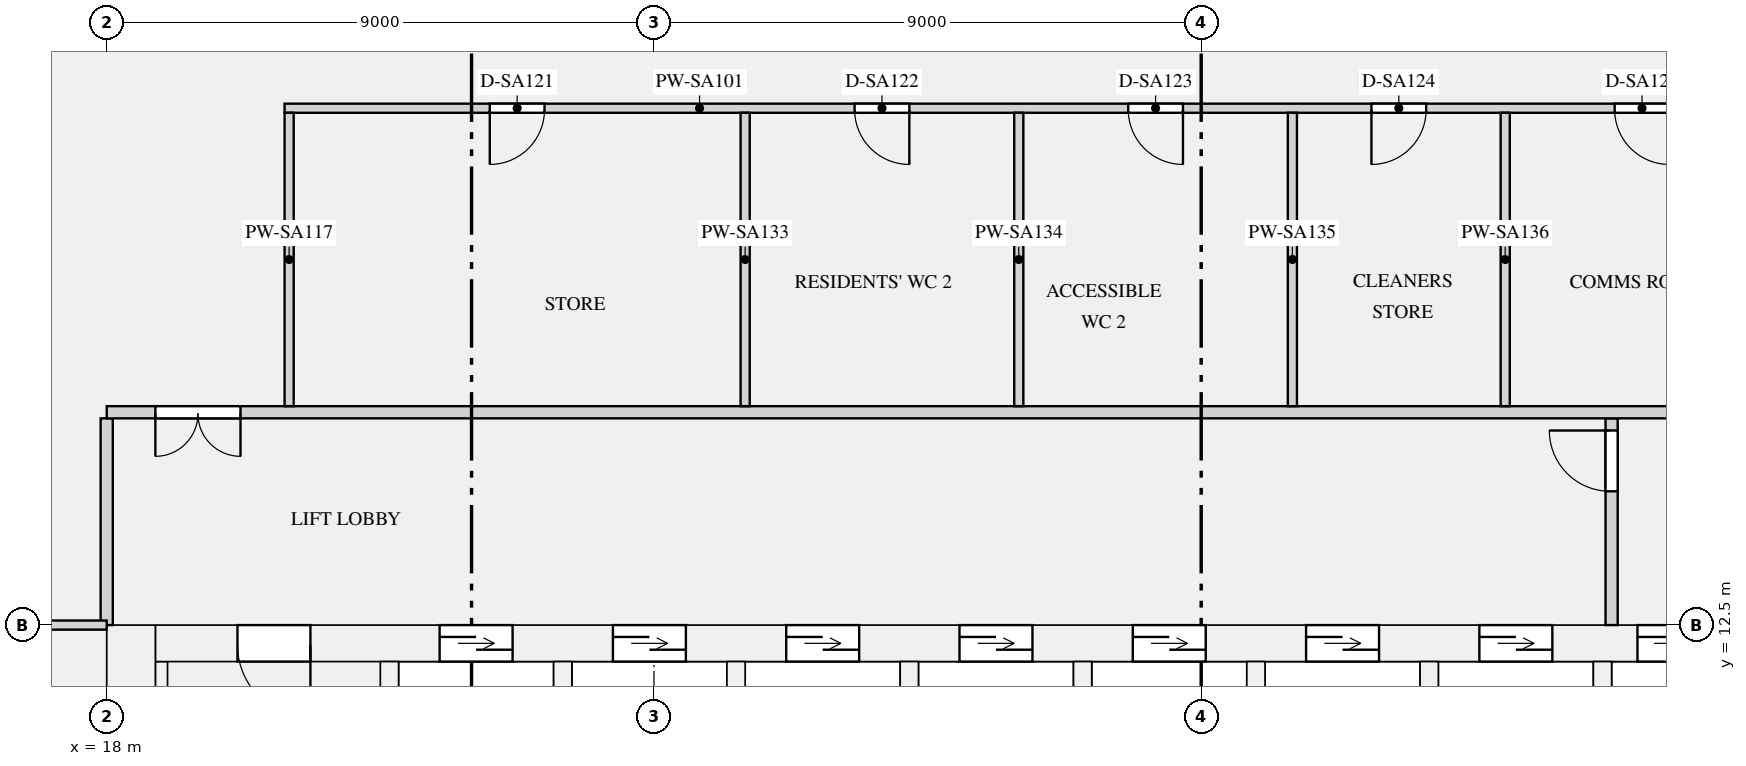
"""IFC4 building model, lengths in metres.
Left out: names, types, materials, properties, quantities, classifications, styles, units other than length and angle.
Written with IfcOpenShell. Run it as: python <this file> out.ifc"""

import sys

from ifc_helpers import new_model, si_unit, direction, frame, frame_2d, origin, place, context, subcontext, project, spatial, rectangle, extrude, element, fill, save


model = new_model("IFC4")
c1 = context("Model", 3, precision=1e-05, world=origin(), true_north=direction((0.0, 1.0)))
c2 = subcontext(c1, "Body", "Model", "MODEL_VIEW")
j1 = project(units=[si_unit("LENGTHUNIT", "METRE"), si_unit("PLANEANGLEUNIT", "RADIAN")], contexts=[c1])
p1 = place(None, origin())
s1 = spatial("IfcSite", under=j1, at=p1, CompositionType="ELEMENT")
p2 = place(p1, origin())
s2 = spatial("IfcBuilding", under=s1, at=p2, CompositionType="ELEMENT")
p3 = place(p2, frame((0.0, 0.0, 77.25)))
s3 = spatial("IfcBuildingStorey", under=s2, at=p3, CompositionType="ELEMENT", Elevation=77.25)
p4 = place(p3, frame((18.4, 0.0, 0.0), z_axis=(0.0, 0.0, 1.0), x_axis=(0.0, 1.0, 0.0)))
e1 = element("IfcWall", 1, at=p4, inside=s3, PredefinedType="SHEAR", context=c2, shape_type="SweptSolid", body=[
    extrude(rectangle(XDim=12.5, YDim=0.8, at=frame_2d((6.25, 0.0))), origin(), (0.0, 0.0, 1.0), 6.3),
])
p5 = place(p3, frame((18.8, 12.2, 0.0), z_axis=(0.0, 0.0, 1.0), x_axis=(1.0, 0.0, 0.0)))
e2 = element("IfcWall", 2, at=p5, inside=s3, PredefinedType="SHEAR", context=c2, shape_type="SweptSolid", body=[
    extrude(rectangle(XDim=34.4, YDim=0.6, at=frame_2d((17.2, 0.0))), origin(), (0.0, 0.0, 1.0), 6.3),
])
p6 = place(p5, frame((4.675, 0.0, 0.0)))
e3 = element("IfcOpeningElement", 3, at=p6, cuts=e2, PredefinedType="OPENING", context=c2, shape_type="SweptSolid", body=[
    extrude(rectangle(XDim=1.2, YDim=2.1, at=frame_2d((0.6, 1.05))), frame((0.0, 0.31, 0.0), z_axis=(0.0, -1.0, 0.0), x_axis=(1.0, 0.0, 0.0)), (0.0, 0.0, 1.0), 0.62),
])
p7 = place(p5, frame((7.525, 0.0, 0.0)))
e4 = element("IfcOpeningElement", 4, at=p7, cuts=e2, PredefinedType="OPENING", context=c2, shape_type="SweptSolid", body=[
    extrude(rectangle(XDim=1.2, YDim=2.1, at=frame_2d((0.6, 1.05))), frame((0.0, 0.31, 0.0), z_axis=(0.0, -1.0, 0.0), x_axis=(1.0, 0.0, 0.0)), (0.0, 0.0, 1.0), 0.62),
])
p8 = place(p5, frame((10.375, 0.0, 0.0)))
e5 = element("IfcOpeningElement", 5, at=p8, cuts=e2, PredefinedType="OPENING", context=c2, shape_type="SweptSolid", body=[
    extrude(rectangle(XDim=1.2, YDim=2.1, at=frame_2d((0.6, 1.05))), frame((0.0, 0.31, 0.0), z_axis=(0.0, -1.0, 0.0), x_axis=(1.0, 0.0, 0.0)), (0.0, 0.0, 1.0), 0.62),
])
p9 = place(p5, frame((13.225, 0.0, 0.0)))
e6 = element("IfcOpeningElement", 6, at=p9, cuts=e2, PredefinedType="OPENING", context=c2, shape_type="SweptSolid", body=[
    extrude(rectangle(XDim=1.2, YDim=2.1, at=frame_2d((0.6, 1.05))), frame((0.0, 0.31, 0.0), z_axis=(0.0, -1.0, 0.0), x_axis=(1.0, 0.0, 0.0)), (0.0, 0.0, 1.0), 0.62),
])
p10 = place(p5, frame((16.075, 0.0, 0.0)))
e7 = element("IfcOpeningElement", 7, at=p10, cuts=e2, PredefinedType="OPENING", context=c2, shape_type="SweptSolid", body=[
    extrude(rectangle(XDim=1.2, YDim=2.1, at=frame_2d((0.6, 1.05))), frame((0.0, 0.31, 0.0), z_axis=(0.0, -1.0, 0.0), x_axis=(1.0, 0.0, 0.0)), (0.0, 0.0, 1.0), 0.62),
])
p11 = place(p5, frame((18.925, 0.0, 0.0)))
e8 = element("IfcOpeningElement", 8, at=p11, cuts=e2, PredefinedType="OPENING", context=c2, shape_type="SweptSolid", body=[
    extrude(rectangle(XDim=1.2, YDim=2.1, at=frame_2d((0.6, 1.05))), frame((0.0, 0.31, 0.0), z_axis=(0.0, -1.0, 0.0), x_axis=(1.0, 0.0, 0.0)), (0.0, 0.0, 1.0), 0.62),
])
p12 = place(p5, frame((21.775, 0.0, 0.0)))
e9 = element("IfcOpeningElement", 9, at=p12, cuts=e2, PredefinedType="OPENING", context=c2, shape_type="SweptSolid", body=[
    extrude(rectangle(XDim=1.2, YDim=2.1, at=frame_2d((0.6, 1.05))), frame((0.0, 0.31, 0.0), z_axis=(0.0, -1.0, 0.0), x_axis=(1.0, 0.0, 0.0)), (0.0, 0.0, 1.0), 0.62),
])
p13 = place(p5, frame((24.375, 0.0, 0.0)))
e10 = element("IfcOpeningElement", 10, at=p13, cuts=e2, PredefinedType="OPENING", context=c2, shape_type="SweptSolid", body=[
    extrude(rectangle(XDim=1.1, YDim=2.1, at=frame_2d((0.55, 1.05))), frame((0.0, 0.31, 0.0), z_axis=(0.0, -1.0, 0.0), x_axis=(1.0, 0.0, 0.0)), (0.0, 0.0, 1.0), 0.62),
])
p14 = place(p5, frame((26.625, 0.0, 0.0)))
e11 = element("IfcOpeningElement", 11, at=p14, cuts=e2, PredefinedType="OPENING", context=c2, shape_type="SweptSolid", body=[
    extrude(rectangle(XDim=1.1, YDim=2.1, at=frame_2d((0.55, 1.05))), frame((0.0, 0.31, 0.0), z_axis=(0.0, -1.0, 0.0), x_axis=(1.0, 0.0, 0.0)), (0.0, 0.0, 1.0), 0.62),
])
p15 = place(p5, frame((28.875, 0.0, 0.0)))
e12 = element("IfcOpeningElement", 12, at=p15, cuts=e2, PredefinedType="OPENING", context=c2, shape_type="SweptSolid", body=[
    extrude(rectangle(XDim=1.1, YDim=2.1, at=frame_2d((0.55, 1.05))), frame((0.0, 0.31, 0.0), z_axis=(0.0, -1.0, 0.0), x_axis=(1.0, 0.0, 0.0)), (0.0, 0.0, 1.0), 0.62),
])
p16 = place(p5, frame((1.35, 0.0, 0.0)))
e13 = element("IfcOpeningElement", 13, at=p16, cuts=e2, PredefinedType="OPENING", context=c2, shape_type="SweptSolid", body=[
    extrude(rectangle(XDim=1.2, YDim=2.1, at=frame_2d((0.6, 1.05))), frame((0.0, 0.31, 0.0), z_axis=(0.0, -1.0, 0.0), x_axis=(1.0, 0.0, 0.0)), (0.0, 0.0, 1.0), 0.62),
])
p17 = place(p5, frame((31.85, 0.0, 0.0)))
e14 = element("IfcOpeningElement", 14, at=p17, cuts=e2, PredefinedType="OPENING", context=c2, shape_type="SweptSolid", body=[
    extrude(rectangle(XDim=1.2, YDim=2.1, at=frame_2d((0.6, 1.05))), frame((0.0, 0.31, 0.0), z_axis=(0.0, -1.0, 0.0), x_axis=(1.0, 0.0, 0.0)), (0.0, 0.0, 1.0), 0.62),
])
p18 = place(p3, frame((18.9, 1.0, 0.0), z_axis=(0.0, 0.0, 1.0), x_axis=(0.0, 1.0, 0.0)))
e15 = element("IfcWall", 15, at=p18, inside=s3, PredefinedType="SHEAR", context=c2, shape_type="SweptSolid", body=[
    extrude(rectangle(XDim=10.9, YDim=0.2, at=frame_2d((5.45, 0.0))), origin(), (0.0, 0.0, 1.0), 6.3),
])
for number, where, z_axis, x_axis in (
    (16, (22.65, 9.35, 0.0), (0.0, 0.0, 1.0), (0.0, 1.0, 0.0)),
    (17, (25.5, 9.35, 0.0), (0.0, 0.0, 1.0), (0.0, 1.0, 0.0)),
    (18, (28.35, 9.35, 0.0), (0.0, 0.0, 1.0), (0.0, 1.0, 0.0)),
    (19, (31.2, 9.35, 0.0), (0.0, 0.0, 1.0), (0.0, 1.0, 0.0)),
    (20, (34.05, 9.35, 0.0), (0.0, 0.0, 1.0), (0.0, 1.0, 0.0)),
    (21, (36.9, 9.35, 0.0), (0.0, 0.0, 1.0), (0.0, 1.0, 0.0)),
    (22, (39.75, 9.35, 0.0), (0.0, 0.0, 1.0), (0.0, 1.0, 0.0)),
):
    element("IfcWall", number, at=place(p3, frame(where, z_axis=z_axis, x_axis=x_axis)), inside=s3, PredefinedType="SHEAR", context=c2, shape_type="SweptSolid", body=[
        extrude(rectangle(XDim=2.55, YDim=0.3, at=frame_2d((1.275, 0.0))), origin(), (0.0, 0.0, 1.0), 6.3),
    ])
p19 = place(p3, frame((42.6, 8.25, 0.0), z_axis=(0.0, 0.0, 1.0), x_axis=(0.0, 1.0, 0.0)))
e23 = element("IfcWall", 23, at=p19, inside=s3, PredefinedType="SHEAR", context=c2, shape_type="SweptSolid", body=[
    extrude(rectangle(XDim=3.65, YDim=0.3, at=frame_2d((1.825, 0.0))), origin(), (0.0, 0.0, 1.0), 6.3),
])
p20 = place(p3, frame((18.0, 12.5, 0.0), z_axis=(0.0, 0.0, 1.0), x_axis=(0.0, 1.0, 0.0)))
e24 = element("IfcWall", 24, at=p20, inside=s3, PredefinedType="PARTITIONING", context=c2, shape_type="SweptSolid", body=[
    extrude(rectangle(XDim=3.4, YDim=0.2, at=frame_2d((1.7, 0.0))), origin(), (0.0, 0.0, 1.0), 5.98),
])
p21 = place(p3, frame((42.75, 12.5, 0.0), z_axis=(0.0, 0.0, 1.0), x_axis=(0.0, 1.0, 0.0)))
e25 = element("IfcWall", 25, at=p21, inside=s3, PredefinedType="PARTITIONING", context=c2, shape_type="SweptSolid", body=[
    extrude(rectangle(XDim=3.4, YDim=0.2, at=frame_2d((1.7, 0.0))), origin(), (0.0, 0.0, 1.0), 5.98),
])
p22 = place(p21, frame((2.2, 0.0, 0.0)))
e26 = element("IfcOpeningElement", 26, at=p22, cuts=e25, PredefinedType="OPENING", context=c2, shape_type="SweptSolid", body=[
    extrude(rectangle(XDim=1.0, YDim=2.1, at=frame_2d((0.5, 1.05))), frame((0.0, 0.11, 0.0), z_axis=(0.0, -1.0, 0.0), x_axis=(1.0, 0.0, 0.0)), (0.0, 0.0, 1.0), 0.22),
])
p23 = place(p3, frame((20.925, 21.0, 0.0), z_axis=(0.0, 0.0, 1.0), x_axis=(1.0, 0.0, 0.0)))
e27 = element("IfcWall", 27, at=p23, inside=s3, PredefinedType="PARTITIONING", context=c2, shape_type="SweptSolid", body=[
    extrude(rectangle(XDim=30.15, YDim=0.15, at=frame_2d((15.075, 0.0))), origin(), (0.0, 0.0, 1.0), 5.98),
])
p24 = place(p23, frame((3.375, 0.0, 0.0)))
e28 = element("IfcOpeningElement", 28, at=p24, cuts=e27, PredefinedType="OPENING", context=c2, shape_type="SweptSolid", body=[
    extrude(rectangle(XDim=0.9, YDim=2.1, at=frame_2d((0.45, 1.05))), frame((0.0, 0.085, 0.0), z_axis=(0.0, -1.0, 0.0), x_axis=(1.0, 0.0, 0.0)), (0.0, 0.0, 1.0), 0.17),
])
p25 = place(p23, frame((9.375, 0.0, 0.0)))
e29 = element("IfcOpeningElement", 29, at=p25, cuts=e27, PredefinedType="OPENING", context=c2, shape_type="SweptSolid", body=[
    extrude(rectangle(XDim=0.9, YDim=2.1, at=frame_2d((0.45, 1.05))), frame((0.0, 0.085, 0.0), z_axis=(0.0, -1.0, 0.0), x_axis=(1.0, 0.0, 0.0)), (0.0, 0.0, 1.0), 0.17),
])
p26 = place(p23, frame((13.875, 0.0, 0.0)))
e30 = element("IfcOpeningElement", 30, at=p26, cuts=e27, PredefinedType="OPENING", context=c2, shape_type="SweptSolid", body=[
    extrude(rectangle(XDim=0.9, YDim=2.1, at=frame_2d((0.45, 1.05))), frame((0.0, 0.085, 0.0), z_axis=(0.0, -1.0, 0.0), x_axis=(1.0, 0.0, 0.0)), (0.0, 0.0, 1.0), 0.17),
])
p27 = place(p23, frame((17.875, 0.0, 0.0)))
e31 = element("IfcOpeningElement", 31, at=p27, cuts=e27, PredefinedType="OPENING", context=c2, shape_type="SweptSolid", body=[
    extrude(rectangle(XDim=0.9, YDim=2.1, at=frame_2d((0.45, 1.05))), frame((0.0, 0.085, 0.0), z_axis=(0.0, -1.0, 0.0), x_axis=(1.0, 0.0, 0.0)), (0.0, 0.0, 1.0), 0.17),
])
p28 = place(p23, frame((21.875, 0.0, 0.0)))
e32 = element("IfcOpeningElement", 32, at=p28, cuts=e27, PredefinedType="OPENING", context=c2, shape_type="SweptSolid", body=[
    extrude(rectangle(XDim=0.9, YDim=2.1, at=frame_2d((0.45, 1.05))), frame((0.0, 0.085, 0.0), z_axis=(0.0, -1.0, 0.0), x_axis=(1.0, 0.0, 0.0)), (0.0, 0.0, 1.0), 0.17),
])
p29 = place(p23, frame((26.875, 0.0, 0.0)))
e33 = element("IfcOpeningElement", 33, at=p29, cuts=e27, PredefinedType="OPENING", context=c2, shape_type="SweptSolid", body=[
    extrude(rectangle(XDim=0.9, YDim=2.1, at=frame_2d((0.45, 1.05))), frame((0.0, 0.085, 0.0), z_axis=(0.0, -1.0, 0.0), x_axis=(1.0, 0.0, 0.0)), (0.0, 0.0, 1.0), 0.17),
])
p30 = place(p3, frame((5.25, 12.5, 0.0), z_axis=(0.0, 0.0, 1.0), x_axis=(1.0, 0.0, 0.0)))
e34 = element("IfcWall", 34, at=p30, inside=s3, PredefinedType="PARTITIONING", context=c2, shape_type="SweptSolid", body=[
    extrude(rectangle(XDim=12.75, YDim=0.15, at=frame_2d((6.375, 0.0))), origin(), (0.0, 0.0, 1.0), 5.98),
])
p31 = place(p30, frame((5.875, 0.0, 0.0)))
e35 = element("IfcOpeningElement", 35, at=p31, cuts=e34, PredefinedType="OPENING", context=c2, shape_type="SweptSolid", body=[
    extrude(rectangle(XDim=0.9, YDim=2.1, at=frame_2d((0.45, 1.05))), frame((0.0, 0.085, 0.0), z_axis=(0.0, -1.0, 0.0), x_axis=(1.0, 0.0, 0.0)), (0.0, 0.0, 1.0), 0.17),
])
p32 = place(p3, frame((18.0, 16.0, 0.0), z_axis=(0.0, 0.0, 1.0), x_axis=(1.0, 0.0, 0.0)))
e36 = element("IfcWall", 36, at=p32, inside=s3, PredefinedType="PARTITIONING", context=c2, shape_type="SweptSolid", body=[
    extrude(rectangle(XDim=36.0, YDim=0.2, at=frame_2d((18.0, 0.0))), origin(), (0.0, 0.0, 1.0), 5.98),
])
p33 = place(p32, frame((0.8, 0.0, 0.0)))
e37 = element("IfcOpeningElement", 37, at=p33, cuts=e36, PredefinedType="OPENING", context=c2, shape_type="SweptSolid", body=[
    extrude(rectangle(XDim=1.4, YDim=2.1, at=frame_2d((0.7, 1.05))), frame((0.0, 0.11, 0.0), z_axis=(0.0, -1.0, 0.0), x_axis=(1.0, 0.0, 0.0)), (0.0, 0.0, 1.0), 0.22),
])
p34 = place(p32, frame((33.8, 0.0, 0.0)))
e38 = element("IfcOpeningElement", 38, at=p34, cuts=e36, PredefinedType="OPENING", context=c2, shape_type="SweptSolid", body=[
    extrude(rectangle(XDim=1.4, YDim=2.1, at=frame_2d((0.7, 1.05))), frame((0.0, 0.11, 0.0), z_axis=(0.0, -1.0, 0.0), x_axis=(1.0, 0.0, 0.0)), (0.0, 0.0, 1.0), 0.22),
])
for number, where, z_axis, x_axis in (
    (39, (21.0, 16.1, 0.0), (0.0, 0.0, 1.0), (0.0, 1.0, 0.0)),
    (40, (28.5, 16.1, 0.0), (0.0, 0.0, 1.0), (0.0, 1.0, 0.0)),
    (41, (33.0, 16.1, 0.0), (0.0, 0.0, 1.0), (0.0, 1.0, 0.0)),
    (42, (37.5, 16.1, 0.0), (0.0, 0.0, 1.0), (0.0, 1.0, 0.0)),
    (43, (41.0, 16.1, 0.0), (0.0, 0.0, 1.0), (0.0, 1.0, 0.0)),
):
    element("IfcWall", number, at=place(p3, frame(where, z_axis=z_axis, x_axis=x_axis)), inside=s3, PredefinedType="PARTITIONING", context=c2, shape_type="SweptSolid", body=[
        extrude(rectangle(XDim=4.825, YDim=0.15, at=frame_2d((2.413, 0.0))), origin(), (0.0, 0.0, 1.0), 5.98),
    ])
p35 = place(p6, origin())
e44 = element("IfcDoor", 44, at=p35, inside=s3, OperationType="DOUBLE_DOOR_SLIDING", PredefinedType="DOOR", context=c2, shape_type="SweptSolid", body=[
    extrude(rectangle(XDim=1.2, YDim=2.1, at=frame_2d((0.6, 1.05))), frame((0.0, 0.025, 0.0), z_axis=(0.0, -1.0, 0.0), x_axis=(1.0, 0.0, 0.0)), (0.0, 0.0, 1.0), 0.05),
])
fill(e3, e44)
p36 = place(p7, origin())
e45 = element("IfcDoor", 45, at=p36, inside=s3, OperationType="DOUBLE_DOOR_SLIDING", PredefinedType="DOOR", context=c2, shape_type="SweptSolid", body=[
    extrude(rectangle(XDim=1.2, YDim=2.1, at=frame_2d((0.6, 1.05))), frame((0.0, 0.025, 0.0), z_axis=(0.0, -1.0, 0.0), x_axis=(1.0, 0.0, 0.0)), (0.0, 0.0, 1.0), 0.05),
])
fill(e4, e45)
p37 = place(p8, origin())
e46 = element("IfcDoor", 46, at=p37, inside=s3, OperationType="DOUBLE_DOOR_SLIDING", PredefinedType="DOOR", context=c2, shape_type="SweptSolid", body=[
    extrude(rectangle(XDim=1.2, YDim=2.1, at=frame_2d((0.6, 1.05))), frame((0.0, 0.025, 0.0), z_axis=(0.0, -1.0, 0.0), x_axis=(1.0, 0.0, 0.0)), (0.0, 0.0, 1.0), 0.05),
])
fill(e5, e46)
p38 = place(p9, origin())
e47 = element("IfcDoor", 47, at=p38, inside=s3, OperationType="DOUBLE_DOOR_SLIDING", PredefinedType="DOOR", context=c2, shape_type="SweptSolid", body=[
    extrude(rectangle(XDim=1.2, YDim=2.1, at=frame_2d((0.6, 1.05))), frame((0.0, 0.025, 0.0), z_axis=(0.0, -1.0, 0.0), x_axis=(1.0, 0.0, 0.0)), (0.0, 0.0, 1.0), 0.05),
])
fill(e6, e47)
p39 = place(p10, origin())
e48 = element("IfcDoor", 48, at=p39, inside=s3, OperationType="DOUBLE_DOOR_SLIDING", PredefinedType="DOOR", context=c2, shape_type="SweptSolid", body=[
    extrude(rectangle(XDim=1.2, YDim=2.1, at=frame_2d((0.6, 1.05))), frame((0.0, 0.025, 0.0), z_axis=(0.0, -1.0, 0.0), x_axis=(1.0, 0.0, 0.0)), (0.0, 0.0, 1.0), 0.05),
])
fill(e7, e48)
p40 = place(p11, origin())
e49 = element("IfcDoor", 49, at=p40, inside=s3, OperationType="DOUBLE_DOOR_SLIDING", PredefinedType="DOOR", context=c2, shape_type="SweptSolid", body=[
    extrude(rectangle(XDim=1.2, YDim=2.1, at=frame_2d((0.6, 1.05))), frame((0.0, 0.025, 0.0), z_axis=(0.0, -1.0, 0.0), x_axis=(1.0, 0.0, 0.0)), (0.0, 0.0, 1.0), 0.05),
])
fill(e8, e49)
p41 = place(p12, origin())
e50 = element("IfcDoor", 50, at=p41, inside=s3, OperationType="DOUBLE_DOOR_SLIDING", PredefinedType="DOOR", context=c2, shape_type="SweptSolid", body=[
    extrude(rectangle(XDim=1.2, YDim=2.1, at=frame_2d((0.6, 1.05))), frame((0.0, 0.025, 0.0), z_axis=(0.0, -1.0, 0.0), x_axis=(1.0, 0.0, 0.0)), (0.0, 0.0, 1.0), 0.05),
])
fill(e9, e50)
p42 = place(p13, origin())
e51 = element("IfcDoor", 51, at=p42, inside=s3, OperationType="DOUBLE_DOOR_SLIDING", PredefinedType="DOOR", context=c2, shape_type="SweptSolid", body=[
    extrude(rectangle(XDim=1.1, YDim=2.1, at=frame_2d((0.55, 1.05))), frame((0.0, 0.025, 0.0), z_axis=(0.0, -1.0, 0.0), x_axis=(1.0, 0.0, 0.0)), (0.0, 0.0, 1.0), 0.05),
])
fill(e10, e51)
p43 = place(p16, frame((1.2, 0.0, 0.0), z_axis=(0.0, 0.0, 1.0), x_axis=(-1.0, 0.0, 0.0)))
e52 = element("IfcDoor", 52, at=p43, inside=s3, OperationType="SINGLE_SWING_LEFT", PredefinedType="DOOR", context=c2, shape_type="SweptSolid", body=[
    extrude(rectangle(XDim=1.2, YDim=2.1, at=frame_2d((0.6, 1.05))), frame((0.0, 0.025, 0.0), z_axis=(0.0, -1.0, 0.0), x_axis=(1.0, 0.0, 0.0)), (0.0, 0.0, 1.0), 0.05),
])
fill(e13, e52)
p44 = place(p22, origin())
e53 = element("IfcDoor", 53, at=p44, inside=s3, OperationType="SINGLE_SWING_RIGHT", PredefinedType="DOOR", context=c2, shape_type="SweptSolid", body=[
    extrude(rectangle(XDim=1.0, YDim=2.1, at=frame_2d((0.5, 1.05))), frame((0.0, 0.025, 0.0), z_axis=(0.0, -1.0, 0.0), x_axis=(1.0, 0.0, 0.0)), (0.0, 0.0, 1.0), 0.05),
])
fill(e26, e53)
p45 = place(p33, frame((1.4, 0.0, 0.0), z_axis=(0.0, 0.0, 1.0), x_axis=(-1.0, 0.0, 0.0)))
e54 = element("IfcDoor", 54, at=p45, inside=s3, OperationType="DOUBLE_DOOR_SINGLE_SWING", PredefinedType="DOOR", context=c2, shape_type="SweptSolid", body=[
    extrude(rectangle(XDim=1.4, YDim=2.1, at=frame_2d((0.7, 1.05))), frame((0.0, 0.025, 0.0), z_axis=(0.0, -1.0, 0.0), x_axis=(1.0, 0.0, 0.0)), (0.0, 0.0, 1.0), 0.05),
])
fill(e37, e54)
p46 = place(p24, frame((0.9, 0.0, 0.0), z_axis=(0.0, 0.0, 1.0), x_axis=(-1.0, 0.0, 0.0)))
e55 = element("IfcDoor", 55, at=p46, inside=s3, OperationType="SINGLE_SWING_RIGHT", PredefinedType="DOOR", context=c2, shape_type="SweptSolid", body=[
    extrude(rectangle(XDim=0.9, YDim=2.1, at=frame_2d((0.45, 1.05))), frame((0.0, 0.025, 0.0), z_axis=(0.0, -1.0, 0.0), x_axis=(1.0, 0.0, 0.0)), (0.0, 0.0, 1.0), 0.05),
])
fill(e28, e55)
p47 = place(p25, frame((0.9, 0.0, 0.0), z_axis=(0.0, 0.0, 1.0), x_axis=(-1.0, 0.0, 0.0)))
e56 = element("IfcDoor", 56, at=p47, inside=s3, OperationType="SINGLE_SWING_LEFT", PredefinedType="DOOR", context=c2, shape_type="SweptSolid", body=[
    extrude(rectangle(XDim=0.9, YDim=2.1, at=frame_2d((0.45, 1.05))), frame((0.0, 0.025, 0.0), z_axis=(0.0, -1.0, 0.0), x_axis=(1.0, 0.0, 0.0)), (0.0, 0.0, 1.0), 0.05),
])
fill(e29, e56)
p48 = place(p26, frame((0.9, 0.0, 0.0), z_axis=(0.0, 0.0, 1.0), x_axis=(-1.0, 0.0, 0.0)))
e57 = element("IfcDoor", 57, at=p48, inside=s3, OperationType="SINGLE_SWING_LEFT", PredefinedType="DOOR", context=c2, shape_type="SweptSolid", body=[
    extrude(rectangle(XDim=0.9, YDim=2.1, at=frame_2d((0.45, 1.05))), frame((0.0, 0.025, 0.0), z_axis=(0.0, -1.0, 0.0), x_axis=(1.0, 0.0, 0.0)), (0.0, 0.0, 1.0), 0.05),
])
fill(e30, e57)
p49 = place(p27, frame((0.9, 0.0, 0.0), z_axis=(0.0, 0.0, 1.0), x_axis=(-1.0, 0.0, 0.0)))
e58 = element("IfcDoor", 58, at=p49, inside=s3, OperationType="SINGLE_SWING_RIGHT", PredefinedType="DOOR", context=c2, shape_type="SweptSolid", body=[
    extrude(rectangle(XDim=0.9, YDim=2.1, at=frame_2d((0.45, 1.05))), frame((0.0, 0.025, 0.0), z_axis=(0.0, -1.0, 0.0), x_axis=(1.0, 0.0, 0.0)), (0.0, 0.0, 1.0), 0.05),
])
fill(e31, e58)
p50 = place(p28, frame((0.9, 0.0, 0.0), z_axis=(0.0, 0.0, 1.0), x_axis=(-1.0, 0.0, 0.0)))
e59 = element("IfcDoor", 59, at=p50, inside=s3, OperationType="SINGLE_SWING_LEFT", PredefinedType="DOOR", context=c2, shape_type="SweptSolid", body=[
    extrude(rectangle(XDim=0.9, YDim=2.1, at=frame_2d((0.45, 1.05))), frame((0.0, 0.025, 0.0), z_axis=(0.0, -1.0, 0.0), x_axis=(1.0, 0.0, 0.0)), (0.0, 0.0, 1.0), 0.05),
])
fill(e32, e59)
save(model, sys.argv[1])
